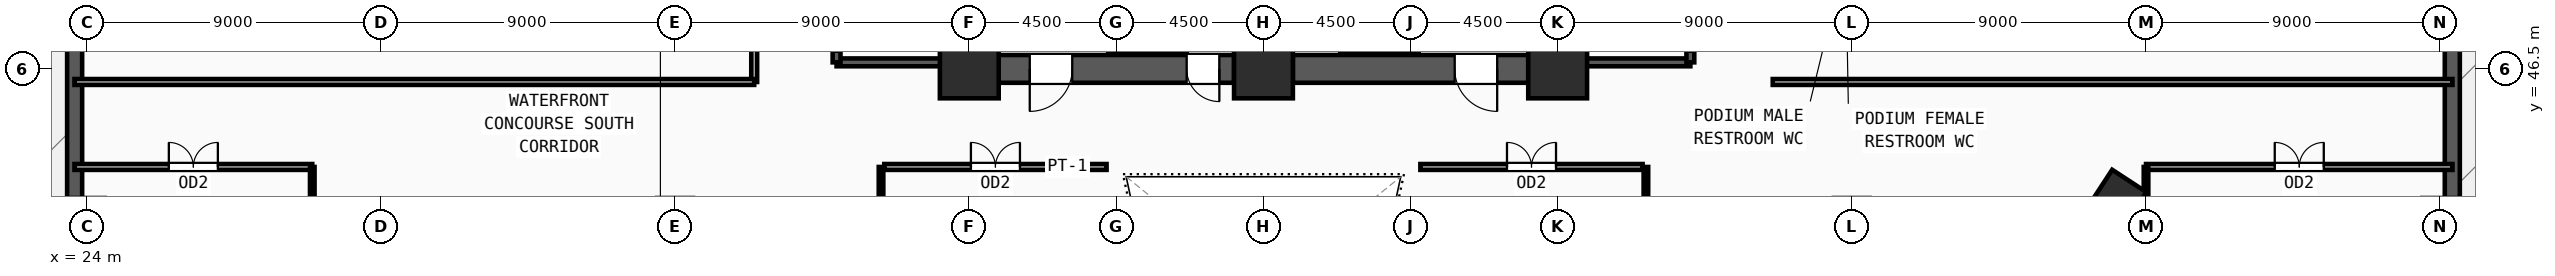
"""IFC4 building model, lengths in metres.
Left out: names, types, materials, properties, quantities, classifications, styles, units other than length and angle.
Written with IfcOpenShell. Run it as: python <this file> out.ifc"""

import sys

from ifc_helpers import new_model, si_unit, direction, frame, frame_2d, origin, origin_2d, place, context, subcontext, project, spatial, rectangle, extrude, source, transform, mapped, element, fill, save


model = new_model("IFC4")
c1 = context("Model", 3, precision=1e-05, world=origin(), true_north=direction((0.0, 1.0)))
c2 = subcontext(c1, "Body", "Model", "MODEL_VIEW")
j1 = project(units=[si_unit("LENGTHUNIT", "METRE"), si_unit("PLANEANGLEUNIT", "RADIAN")], contexts=[c1])
p1 = place(None, origin())
s1 = spatial("IfcSite", under=j1, at=p1, CompositionType="ELEMENT")
p2 = place(p1, origin())
s2 = spatial("IfcBuilding", under=s1, at=p2, CompositionType="ELEMENT")
p3 = place(p2, frame((0.0, 0.0, 18.9)))
s3 = spatial("IfcBuildingStorey", under=s2, at=p3, CompositionType="ELEMENT", Elevation=18.9)
m1 = source(origin(), c2, "Body", "SweptSolid", [
    extrude(rectangle(XDim=1.8, YDim=1.8, at=origin_2d()), origin(), (0.0, 0.0, 1.0), 4.5),
])
for number, where, z_axis, x_axis in (
    (1, (51.0, 46.5, 0.0), (0.0, 0.0, 1.0), (1.0, 0.0, 0.0)),
    (2, (60.0, 46.5, 0.0), (0.0, 0.0, 1.0), (1.0, 0.0, 0.0)),
    (3, (69.0, 46.5, 0.0), (0.0, 0.0, 1.0), (1.0, 0.0, 0.0)),
):
    element("IfcColumn", number, at=place(p3, frame(where, z_axis=z_axis, x_axis=x_axis)), inside=s3, PredefinedType="COLUMN", context=c2, shape_type="MappedRepresentation", body=[
        mapped(m1, transform((0.0, 0.0, 0.0), x_axis=(1.0, 0.0, 0.0), y_axis=(0.0, 1.0, 0.0), z_axis=(0.0, 0.0, 1.0), scale=1.0)),
    ])
m2 = source(origin(), c2, "Body", "SweptSolid", [
    extrude(rectangle(XDim=1.55, YDim=1.25, at=origin_2d()), origin(), (0.0, 0.0, 1.0), 4.5),
])
p4 = place(p3, frame((86.064, 42.423, 0.0), z_axis=(0.0, 0.0, 1.0), x_axis=(0.546978918409, 0.837146380758, 0.0)))
e4 = element("IfcColumn", 4, at=p4, inside=s3, PredefinedType="COLUMN", context=c2, shape_type="MappedRepresentation", body=[
    mapped(m2, transform((0.0, 0.0, 0.0), x_axis=(1.0, 0.0, 0.0), y_axis=(0.0, 1.0, 0.0), z_axis=(0.0, 0.0, 1.0), scale=1.0)),
])
p5 = place(p3, frame((96.37, 24.54, 0.0), z_axis=(0.0, 0.0, 1.0), x_axis=(0.0, 1.0, 0.0)))
e5 = element("IfcWall", 5, at=p5, inside=s3, PredefinedType="SOLIDWALL", context=c2, shape_type="SweptSolid", body=[
    extrude(rectangle(XDim=60.92, YDim=0.46, at=frame_2d((30.46, 0.0))), origin(), (0.0, 0.0, 1.0), 3.6),
])
m3 = source(origin(), c2, "Body", "SweptSolid", [
    extrude(rectangle(XDim=2.7, YDim=2.35, at=frame_2d((1.35, 1.175))), frame((0.0, 0.24, 0.0), z_axis=(0.0, -1.0, 0.0), x_axis=(1.0, 0.0, 0.0)), (0.0, 0.0, 1.0), 0.48),
])
p6 = place(p5, frame((8.803, 0.0, 0.55)))
e6 = element("IfcOpeningElement", 6, at=p6, cuts=e5, PredefinedType="OPENING", context=c2, shape_type="MappedRepresentation", body=[
    mapped(m3, transform((0.0, 0.0, 0.0), x_axis=(1.0, 0.0, 0.0), y_axis=(0.0, 1.0, 0.0), z_axis=(0.0, 0.0, 1.0), scale=1.0)),
])
p7 = place(p5, frame((29.11, 0.0, 0.55)))
e7 = element("IfcOpeningElement", 7, at=p7, cuts=e5, PredefinedType="OPENING", context=c2, shape_type="MappedRepresentation", body=[
    mapped(m3, transform((0.0, 0.0, 0.0), x_axis=(1.0, 0.0, 0.0), y_axis=(0.0, 1.0, 0.0), z_axis=(0.0, 0.0, 1.0), scale=1.0)),
])
p8 = place(p5, frame((39.263, 0.0, 0.55)))
e8 = element("IfcOpeningElement", 8, at=p8, cuts=e5, PredefinedType="OPENING", context=c2, shape_type="MappedRepresentation", body=[
    mapped(m3, transform((0.0, 0.0, 0.0), x_axis=(1.0, 0.0, 0.0), y_axis=(0.0, 1.0, 0.0), z_axis=(0.0, 0.0, 1.0), scale=1.0)),
])
p9 = place(p5, frame((49.417, 0.0, 0.55)))
e9 = element("IfcOpeningElement", 9, at=p9, cuts=e5, PredefinedType="OPENING", context=c2, shape_type="MappedRepresentation", body=[
    mapped(m3, transform((0.0, 0.0, 0.0), x_axis=(1.0, 0.0, 0.0), y_axis=(0.0, 1.0, 0.0), z_axis=(0.0, 0.0, 1.0), scale=1.0)),
])
p10 = place(p3, frame((23.63, 85.46, 0.0), z_axis=(0.0, 0.0, 1.0), x_axis=(0.0, -1.0, 0.0)))
e10 = element("IfcWall", 10, at=p10, inside=s3, PredefinedType="SOLIDWALL", context=c2, shape_type="SweptSolid", body=[
    extrude(rectangle(XDim=60.92, YDim=0.46, at=frame_2d((30.46, 0.0))), origin(), (0.0, 0.0, 1.0), 3.6),
])
p11 = place(p10, frame((8.803, 0.0, 0.55)))
e11 = element("IfcOpeningElement", 11, at=p11, cuts=e10, PredefinedType="OPENING", context=c2, shape_type="MappedRepresentation", body=[
    mapped(m3, transform((0.0, 0.0, 0.0), x_axis=(1.0, 0.0, 0.0), y_axis=(0.0, 1.0, 0.0), z_axis=(0.0, 0.0, 1.0), scale=1.0)),
])
p12 = place(p10, frame((18.957, 0.0, 0.55)))
e12 = element("IfcOpeningElement", 12, at=p12, cuts=e10, PredefinedType="OPENING", context=c2, shape_type="MappedRepresentation", body=[
    mapped(m3, transform((0.0, 0.0, 0.0), x_axis=(1.0, 0.0, 0.0), y_axis=(0.0, 1.0, 0.0), z_axis=(0.0, 0.0, 1.0), scale=1.0)),
])
p13 = place(p10, frame((29.11, 0.0, 0.55)))
e13 = element("IfcOpeningElement", 13, at=p13, cuts=e10, PredefinedType="OPENING", context=c2, shape_type="MappedRepresentation", body=[
    mapped(m3, transform((0.0, 0.0, 0.0), x_axis=(1.0, 0.0, 0.0), y_axis=(0.0, 1.0, 0.0), z_axis=(0.0, 0.0, 1.0), scale=1.0)),
])
p14 = place(p10, frame((49.417, 0.0, 0.55)))
e14 = element("IfcOpeningElement", 14, at=p14, cuts=e10, PredefinedType="OPENING", context=c2, shape_type="MappedRepresentation", body=[
    mapped(m3, transform((0.0, 0.0, 0.0), x_axis=(1.0, 0.0, 0.0), y_axis=(0.0, 1.0, 0.0), z_axis=(0.0, 0.0, 1.0), scale=1.0)),
])
p15 = place(p3, frame((68.1, 46.5, 0.0), z_axis=(0.0, 0.0, 1.0), x_axis=(-1.0, 0.0, 0.0)))
e15 = element("IfcWall", 15, at=p15, inside=s3, PredefinedType="SHEAR", context=c2, shape_type="SweptSolid", body=[
    extrude(rectangle(XDim=7.2, YDim=0.85, at=frame_2d((3.6, 0.0))), origin(), (0.0, 0.0, 1.0), 3.6),
])
m4 = source(origin(), c2, "Body", "SweptSolid", [
    extrude(rectangle(XDim=1.3, YDim=2.2, at=frame_2d((0.65, 1.1))), frame((0.0, 0.435, 0.0), z_axis=(0.0, -1.0, 0.0), x_axis=(1.0, 0.0, 0.0)), (0.0, 0.0, 1.0), 0.87),
])
p16 = place(p15, frame((0.95, 0.0, 0.0)))
e16 = element("IfcOpeningElement", 16, at=p16, cuts=e15, PredefinedType="OPENING", context=c2, shape_type="MappedRepresentation", body=[
    mapped(m4, transform((0.0, 0.0, 0.0), x_axis=(1.0, 0.0, 0.0), y_axis=(0.0, 1.0, 0.0), z_axis=(0.0, 0.0, 1.0), scale=1.0)),
])
p17 = place(p3, frame((59.1, 46.5, 0.0), z_axis=(0.0, 0.0, 1.0), x_axis=(-1.0, 0.0, 0.0)))
e17 = element("IfcWall", 17, at=p17, inside=s3, PredefinedType="SHEAR", context=c2, shape_type="SweptSolid", body=[
    extrude(rectangle(XDim=7.2, YDim=0.85, at=frame_2d((3.6, 0.0))), origin(), (0.0, 0.0, 1.0), 3.6),
])
p18 = place(p17, frame((4.95, 0.0, 0.0)))
e18 = element("IfcOpeningElement", 18, at=p18, cuts=e17, PredefinedType="OPENING", context=c2, shape_type="MappedRepresentation", body=[
    mapped(m4, transform((0.0, 0.0, 0.0), x_axis=(1.0, 0.0, 0.0), y_axis=(0.0, 1.0, 0.0), z_axis=(0.0, 0.0, 1.0), scale=1.0)),
])
m5 = source(origin(), c2, "Body", "SweptSolid", [
    extrude(rectangle(XDim=1.0, YDim=2.2, at=frame_2d((0.5, 1.1))), frame((0.0, 0.435, 0.0), z_axis=(0.0, -1.0, 0.0), x_axis=(1.0, 0.0, 0.0)), (0.0, 0.0, 1.0), 0.87),
])
p19 = place(p17, frame((0.45, 0.0, 0.0)))
e19 = element("IfcOpeningElement", 19, at=p19, cuts=e17, PredefinedType="OPENING", context=c2, shape_type="MappedRepresentation", body=[
    mapped(m5, transform((0.0, 0.0, 0.0), x_axis=(1.0, 0.0, 0.0), y_axis=(0.0, 1.0, 0.0), z_axis=(0.0, 0.0, 1.0), scale=1.0)),
])
p20 = place(p3, frame((46.94, 46.7, 0.0), z_axis=(0.0, 0.0, 1.0), x_axis=(1.0, 0.0, 0.0)))
e20 = element("IfcWall", 20, at=p20, inside=s3, PredefinedType="SOLIDWALL", context=c2, shape_type="SweptSolid", body=[
    extrude(rectangle(XDim=3.44, YDim=0.24, at=frame_2d((1.72, 0.0))), origin(), (0.0, 0.0, 1.0), 3.6),
])
p21 = place(p3, frame((50.38, 46.7, 0.0), z_axis=(0.0, 0.0, 1.0), x_axis=(0.0, 1.0, 0.0)))
e21 = element("IfcWall", 21, at=p21, inside=s3, PredefinedType="SOLIDWALL", context=c2, shape_type="SweptSolid", body=[
    extrude(rectangle(XDim=7.82, YDim=0.24, at=frame_2d((3.91, 0.0))), origin(), (0.0, 0.0, 1.0), 3.6),
])
p22 = place(p3, frame((46.94, 54.52, 0.0), z_axis=(0.0, 0.0, 1.0), x_axis=(0.0, -1.0, 0.0)))
e22 = element("IfcWall", 22, at=p22, inside=s3, PredefinedType="SOLIDWALL", context=c2, shape_type="SweptSolid", body=[
    extrude(rectangle(XDim=7.82, YDim=0.24, at=frame_2d((3.91, 0.0))), origin(), (0.0, 0.0, 1.0), 3.6),
])
m6 = source(origin(), c2, "Body", "SweptSolid", [
    extrude(rectangle(XDim=1.2, YDim=2.2, at=frame_2d((0.6, 1.1))), frame((0.0, 0.13, 0.0), z_axis=(0.0, -1.0, 0.0), x_axis=(1.0, 0.0, 0.0)), (0.0, 0.0, 1.0), 0.26),
])
p23 = place(p22, frame((6.3, 0.0, 0.0)))
e23 = element("IfcOpeningElement", 23, at=p23, cuts=e22, PredefinedType="OPENING", context=c2, shape_type="MappedRepresentation", body=[
    mapped(m6, transform((0.0, 0.0, 0.0), x_axis=(1.0, 0.0, 0.0), y_axis=(0.0, 1.0, 0.0), z_axis=(0.0, 0.0, 1.0), scale=1.0)),
])
p24 = place(p3, frame((69.62, 46.7, 0.0), z_axis=(0.0, 0.0, 1.0), x_axis=(1.0, 0.0, 0.0)))
e24 = element("IfcWall", 24, at=p24, inside=s3, PredefinedType="SOLIDWALL", context=c2, shape_type="SweptSolid", body=[
    extrude(rectangle(XDim=3.44, YDim=0.24, at=frame_2d((1.72, 0.0))), origin(), (0.0, 0.0, 1.0), 3.6),
])
p25 = place(p3, frame((73.06, 46.7, 0.0), z_axis=(0.0, 0.0, 1.0), x_axis=(0.0, 1.0, 0.0)))
e25 = element("IfcWall", 25, at=p25, inside=s3, PredefinedType="SOLIDWALL", context=c2, shape_type="SweptSolid", body=[
    extrude(rectangle(XDim=7.82, YDim=0.24, at=frame_2d((3.91, 0.0))), origin(), (0.0, 0.0, 1.0), 3.6),
])
p26 = place(p25, frame((0.32, 0.0, 0.0)))
e26 = element("IfcOpeningElement", 26, at=p26, cuts=e25, PredefinedType="OPENING", context=c2, shape_type="MappedRepresentation", body=[
    mapped(m6, transform((0.0, 0.0, 0.0), x_axis=(1.0, 0.0, 0.0), y_axis=(0.0, 1.0, 0.0), z_axis=(0.0, 0.0, 1.0), scale=1.0)),
])
p27 = place(p3, frame((69.62, 54.52, 0.0), z_axis=(0.0, 0.0, 1.0), x_axis=(0.0, -1.0, 0.0)))
e27 = element("IfcWall", 27, at=p27, inside=s3, PredefinedType="SOLIDWALL", context=c2, shape_type="SweptSolid", body=[
    extrude(rectangle(XDim=7.82, YDim=0.24, at=frame_2d((3.91, 0.0))), origin(), (0.0, 0.0, 1.0), 3.6),
])
p28 = place(p3, frame((48.4, 43.5, 0.0), z_axis=(0.0, 0.0, 1.0), x_axis=(1.0, 0.0, 0.0)))
e28 = element("IfcWall", 28, at=p28, inside=s3, PredefinedType="PARTITIONING", context=c2, shape_type="SweptSolid", body=[
    extrude(rectangle(XDim=6.8, YDim=0.18, at=frame_2d((3.4, 0.0))), origin(), (0.0, 0.0, 1.0), 3.6),
])
m7 = source(origin(), c2, "Body", "SweptSolid", [
    extrude(rectangle(XDim=1.5, YDim=2.2, at=frame_2d((0.75, 1.1))), frame((0.0, 0.1, 0.0), z_axis=(0.0, -1.0, 0.0), x_axis=(1.0, 0.0, 0.0)), (0.0, 0.0, 1.0), 0.2),
])
p29 = place(p28, frame((2.65, 0.0, 0.0)))
e29 = element("IfcOpeningElement", 29, at=p29, cuts=e28, PredefinedType="OPENING", context=c2, shape_type="MappedRepresentation", body=[
    mapped(m7, transform((0.0, 0.0, 0.0), x_axis=(1.0, 0.0, 0.0), y_axis=(0.0, 1.0, 0.0), z_axis=(0.0, 0.0, 1.0), scale=1.0)),
])
p30 = place(p3, frame((64.8, 43.5, 0.0), z_axis=(0.0, 0.0, 1.0), x_axis=(1.0, 0.0, 0.0)))
e30 = element("IfcWall", 30, at=p30, inside=s3, PredefinedType="PARTITIONING", context=c2, shape_type="SweptSolid", body=[
    extrude(rectangle(XDim=6.8, YDim=0.18, at=frame_2d((3.4, 0.0))), origin(), (0.0, 0.0, 1.0), 3.6),
])
p31 = place(p30, frame((2.65, 0.0, 0.0)))
e31 = element("IfcOpeningElement", 31, at=p31, cuts=e30, PredefinedType="OPENING", context=c2, shape_type="MappedRepresentation", body=[
    mapped(m7, transform((0.0, 0.0, 0.0), x_axis=(1.0, 0.0, 0.0), y_axis=(0.0, 1.0, 0.0), z_axis=(0.0, 0.0, 1.0), scale=1.0)),
])
p32 = place(p3, frame((23.625, 43.5, 0.0), z_axis=(0.0, 0.0, 1.0), x_axis=(1.0, 0.0, 0.0)))
e32 = element("IfcWall", 32, at=p32, inside=s3, PredefinedType="PARTITIONING", context=c2, shape_type="SweptSolid", body=[
    extrude(rectangle(XDim=7.275, YDim=0.18, at=frame_2d((3.637, 0.0))), origin(), (0.0, 0.0, 1.0), 3.6),
])
p33 = place(p32, frame((2.887, 0.0, 0.0)))
e33 = element("IfcOpeningElement", 33, at=p33, cuts=e32, PredefinedType="OPENING", context=c2, shape_type="MappedRepresentation", body=[
    mapped(m7, transform((0.0, 0.0, 0.0), x_axis=(1.0, 0.0, 0.0), y_axis=(0.0, 1.0, 0.0), z_axis=(0.0, 0.0, 1.0), scale=1.0)),
])
p34 = place(p3, frame((87.0, 43.5, 0.0), z_axis=(0.0, 0.0, 1.0), x_axis=(1.0, 0.0, 0.0)))
e34 = element("IfcWall", 34, at=p34, inside=s3, PredefinedType="PARTITIONING", context=c2, shape_type="SweptSolid", body=[
    extrude(rectangle(XDim=9.375, YDim=0.18, at=frame_2d((4.688, 0.0))), origin(), (0.0, 0.0, 1.0), 3.6),
])
p35 = place(p34, frame((3.938, 0.0, 0.0)))
e35 = element("IfcOpeningElement", 35, at=p35, cuts=e34, PredefinedType="OPENING", context=c2, shape_type="MappedRepresentation", body=[
    mapped(m7, transform((0.0, 0.0, 0.0), x_axis=(1.0, 0.0, 0.0), y_axis=(0.0, 1.0, 0.0), z_axis=(0.0, 0.0, 1.0), scale=1.0)),
])
p36 = place(p3, frame((44.42, 46.1, 0.0), z_axis=(0.0, 0.0, 1.0), x_axis=(0.0, 1.0, 0.0)))
e36 = element("IfcWall", 36, at=p36, inside=s3, PredefinedType="PARTITIONING", context=c2, shape_type="SweptSolid", body=[
    extrude(rectangle(XDim=22.0, YDim=0.18, at=frame_2d((11.0, 0.0))), origin(), (0.0, 0.0, 1.0), 3.6),
])
p37 = place(p36, frame((10.25, 0.0, 0.0)))
e37 = element("IfcOpeningElement", 37, at=p37, cuts=e36, PredefinedType="OPENING", context=c2, shape_type="MappedRepresentation", body=[
    mapped(m7, transform((0.0, 0.0, 0.0), x_axis=(1.0, 0.0, 0.0), y_axis=(0.0, 1.0, 0.0), z_axis=(0.0, 0.0, 1.0), scale=1.0)),
])
for number, where, z_axis, x_axis in (
    (38, (23.625, 46.1, 0.0), (0.0, 0.0, 1.0), (1.0, 0.0, 0.0)),
    (39, (75.58, 46.1, 0.0), (0.0, 0.0, 1.0), (1.0, 0.0, 0.0)),
):
    element("IfcWall", number, at=place(p3, frame(where, z_axis=z_axis, x_axis=x_axis)), inside=s3, PredefinedType="PARTITIONING", context=c2, shape_type="SweptSolid", body=[
        extrude(rectangle(XDim=20.795, YDim=0.18, at=frame_2d((10.397, 0.0))), origin(), (0.0, 0.0, 1.0), 3.6),
    ])
for number, where, z_axis, x_axis in (
    (40, (30.9, 23.625, 0.0), (0.0, 0.0, 1.0), (0.0, 1.0, 0.0)),
    (41, (87.0, 23.625, 0.0), (0.0, 0.0, 1.0), (0.0, 1.0, 0.0)),
    (42, (48.3, 23.625, 0.0), (0.0, 0.0, 1.0), (0.0, 1.0, 0.0)),
    (43, (71.7, 23.625, 0.0), (0.0, 0.0, 1.0), (0.0, 1.0, 0.0)),
):
    element("IfcWall", number, at=place(p3, frame(where, z_axis=z_axis, x_axis=x_axis)), inside=s3, PredefinedType="PARTITIONING", context=c2, shape_type="SweptSolid", body=[
        extrude(rectangle(XDim=19.875, YDim=0.14, at=frame_2d((9.938, 0.0))), origin(), (0.0, 0.0, 1.0), 3.6),
    ])
m8 = source(origin(), c2, "Body", "SweptSolid", [
    extrude(rectangle(XDim=1.3, YDim=2.2, at=frame_2d((0.65, 1.1))), frame((0.0, 0.025, 0.0), z_axis=(0.0, -1.0, 0.0), x_axis=(1.0, 0.0, 0.0)), (0.0, 0.0, 1.0), 0.05),
])
p38 = place(p18, origin())
e44 = element("IfcDoor", 44, at=p38, inside=s3, OperationType="SINGLE_SWING_RIGHT", PredefinedType="DOOR", context=c2, shape_type="MappedRepresentation", body=[
    mapped(m8, transform((0.0, 0.0, 0.0), x_axis=(1.0, 0.0, 0.0), y_axis=(0.0, 1.0, 0.0), z_axis=(0.0, 0.0, 1.0), scale=1.0)),
])
fill(e18, e44)
m9 = source(origin(), c2, "Body", "SweptSolid", [
    extrude(rectangle(XDim=1.0, YDim=2.2, at=frame_2d((0.5, 1.1))), frame((0.0, 0.025, 0.0), z_axis=(0.0, -1.0, 0.0), x_axis=(1.0, 0.0, 0.0)), (0.0, 0.0, 1.0), 0.05),
])
p39 = place(p19, origin())
e45 = element("IfcDoor", 45, at=p39, inside=s3, OperationType="SINGLE_SWING_LEFT", PredefinedType="DOOR", context=c2, shape_type="MappedRepresentation", body=[
    mapped(m9, transform((0.0, 0.0, 0.0), x_axis=(1.0, 0.0, 0.0), y_axis=(0.0, 1.0, 0.0), z_axis=(0.0, 0.0, 1.0), scale=1.0)),
])
fill(e19, e45)
p40 = place(p16, origin())
e46 = element("IfcDoor", 46, at=p40, inside=s3, OperationType="SINGLE_SWING_LEFT", PredefinedType="DOOR", context=c2, shape_type="MappedRepresentation", body=[
    mapped(m8, transform((0.0, 0.0, 0.0), x_axis=(1.0, 0.0, 0.0), y_axis=(0.0, 1.0, 0.0), z_axis=(0.0, 0.0, 1.0), scale=1.0)),
])
fill(e16, e46)
m10 = source(origin(), c2, "Body", "SweptSolid", [
    extrude(rectangle(XDim=1.5, YDim=2.2, at=frame_2d((0.75, 1.1))), frame((0.0, 0.025, 0.0), z_axis=(0.0, -1.0, 0.0), x_axis=(1.0, 0.0, 0.0)), (0.0, 0.0, 1.0), 0.05),
])
p41 = place(p29, origin())
e47 = element("IfcDoor", 47, at=p41, inside=s3, OperationType="DOUBLE_DOOR_SINGLE_SWING", PredefinedType="DOOR", context=c2, shape_type="MappedRepresentation", body=[
    mapped(m10, transform((0.0, 0.0, 0.0), x_axis=(1.0, 0.0, 0.0), y_axis=(0.0, 1.0, 0.0), z_axis=(0.0, 0.0, 1.0), scale=1.0)),
])
fill(e29, e47)
p42 = place(p31, origin())
e48 = element("IfcDoor", 48, at=p42, inside=s3, OperationType="DOUBLE_DOOR_SINGLE_SWING", PredefinedType="DOOR", context=c2, shape_type="MappedRepresentation", body=[
    mapped(m10, transform((0.0, 0.0, 0.0), x_axis=(1.0, 0.0, 0.0), y_axis=(0.0, 1.0, 0.0), z_axis=(0.0, 0.0, 1.0), scale=1.0)),
])
fill(e31, e48)
p43 = place(p33, origin())
e49 = element("IfcDoor", 49, at=p43, inside=s3, OperationType="DOUBLE_DOOR_SINGLE_SWING", PredefinedType="DOOR", context=c2, shape_type="MappedRepresentation", body=[
    mapped(m10, transform((0.0, 0.0, 0.0), x_axis=(1.0, 0.0, 0.0), y_axis=(0.0, 1.0, 0.0), z_axis=(0.0, 0.0, 1.0), scale=1.0)),
])
fill(e33, e49)
p44 = place(p35, origin())
e50 = element("IfcDoor", 50, at=p44, inside=s3, OperationType="DOUBLE_DOOR_SINGLE_SWING", PredefinedType="DOOR", context=c2, shape_type="MappedRepresentation", body=[
    mapped(m10, transform((0.0, 0.0, 0.0), x_axis=(1.0, 0.0, 0.0), y_axis=(0.0, 1.0, 0.0), z_axis=(0.0, 0.0, 1.0), scale=1.0)),
])
fill(e35, e50)
save(model, sys.argv[1])
